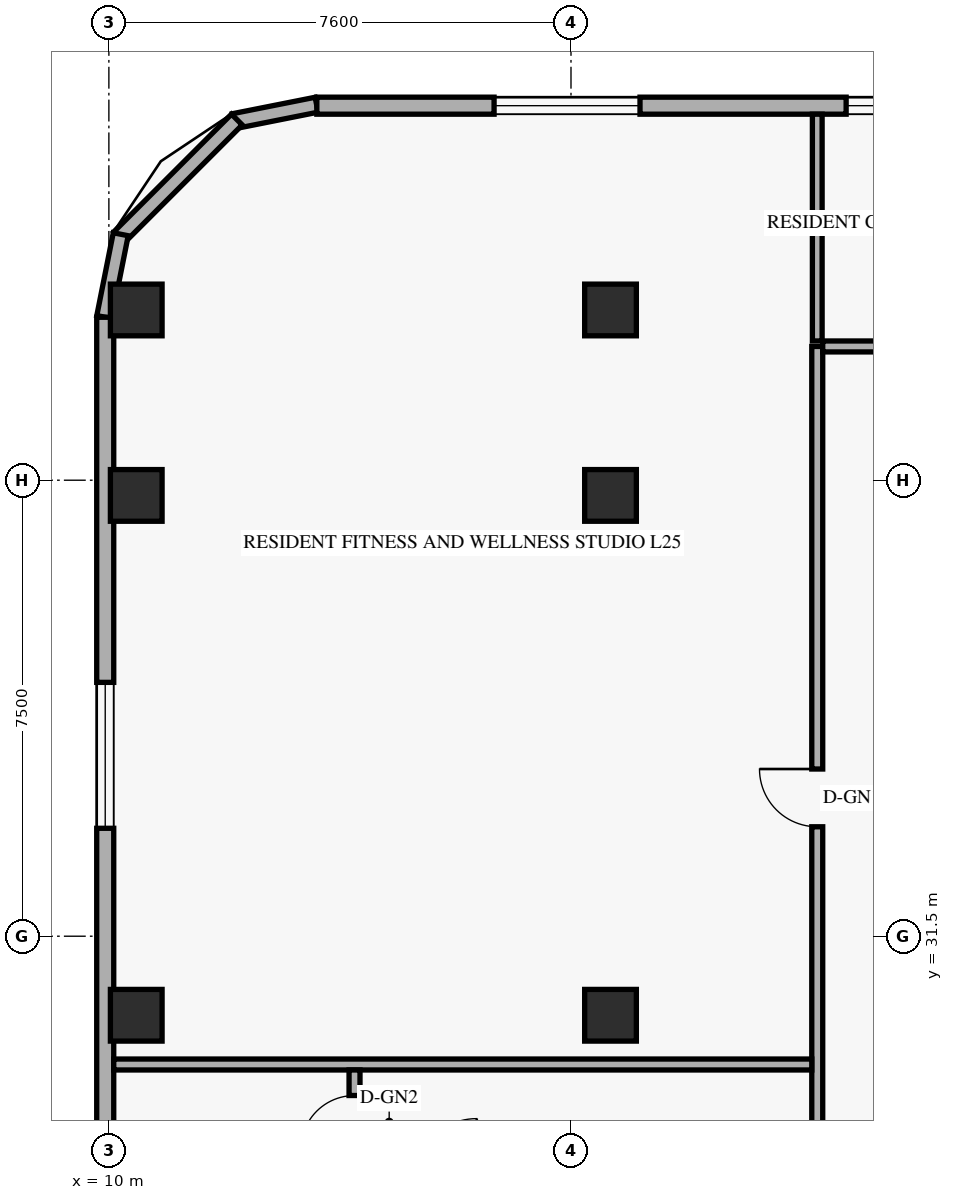
"""IFC4 building model, lengths in metres.
Left out: names, types, materials, properties, quantities, classifications, styles, units other than length and angle.
Written with IfcOpenShell. Run it as: python <this file> out.ifc"""

import sys

from ifc_helpers import new_model, si_unit, direction, frame, frame_2d, origin, origin_2d, place, context, subcontext, project, spatial, rectangle, extrude, element, fill, save


model = new_model("IFC4")
c1 = context("Model", 3, precision=1e-05, world=origin(), true_north=direction((0.0, 1.0)))
c2 = subcontext(c1, "Body", "Model", "MODEL_VIEW")
j1 = project(units=[si_unit("LENGTHUNIT", "METRE"), si_unit("PLANEANGLEUNIT", "RADIAN")], contexts=[c1])
p1 = place(None, origin())
s1 = spatial("IfcSite", under=j1, at=p1, CompositionType="ELEMENT")
p2 = place(p1, origin())
s2 = spatial("IfcBuilding", under=s1, at=p2, CompositionType="ELEMENT")
p3 = place(p2, frame((0.0, 0.0, 98.4)))
s3 = spatial("IfcBuildingStorey", under=s2, at=p3, CompositionType="ELEMENT", Elevation=98.4)
for number, where, z_axis, x_axis in (
    (1, (10.45, 30.2, 0.0), (0.0, 0.0, 1.0), (1.0, 0.0, 0.0)),
    (2, (10.45, 38.75, 0.0), (0.0, 0.0, 1.0), (1.0, 0.0, 0.0)),
    (3, (10.45, 41.8, 0.0), (0.0, 0.0, 1.0), (1.0, 0.0, 0.0)),
    (4, (18.25, 30.2, 0.0), (0.0, 0.0, 1.0), (1.0, 0.0, 0.0)),
    (5, (18.25, 38.75, 0.0), (0.0, 0.0, 1.0), (1.0, 0.0, 0.0)),
    (6, (18.25, 41.8, 0.0), (0.0, 0.0, 1.0), (1.0, 0.0, 0.0)),
):
    element("IfcColumn", number, at=place(p3, frame(where, z_axis=z_axis, x_axis=x_axis)), inside=s3, PredefinedType="COLUMN", context=c2, shape_type="SweptSolid", body=[
        extrude(rectangle(XDim=0.85, YDim=0.85, at=origin_2d()), origin(), (0.0, 0.0, 1.0), 4.2),
    ])
p4 = place(p3, frame((13.417, 45.176, 0.0), z_axis=(0.0, 0.0, 1.0), x_axis=(-0.980809899341, -0.19496651342, 0.0)))
e7 = element("IfcWall", 7, at=p4, inside=s3, PredefinedType="SOLIDWALL", context=c2, shape_type="SweptSolid", body=[
    extrude(rectangle(XDim=1.389, YDim=0.25, at=frame_2d((0.694, 0.0))), origin(), (0.0, 0.0, 1.0), 3.96),
])
p5 = place(p3, frame((12.105, 44.932, 0.0), z_axis=(0.0, 0.0, 1.0), x_axis=(-0.707151344399, -0.707062215165, 0.0)))
e8 = element("IfcWall", 8, at=p5, inside=s3, PredefinedType="SOLIDWALL", context=c2, shape_type="SweptSolid", body=[
    extrude(rectangle(XDim=2.739, YDim=0.25, at=frame_2d((1.37, 0.0))), origin(), (0.0, 0.0, 1.0), 3.96),
])
p6 = place(p3, frame((10.195, 43.045, 0.0), z_axis=(0.0, 0.0, 1.0), x_axis=(-0.195000137217, -0.980803214965, 0.0)))
e9 = element("IfcWall", 9, at=p6, inside=s3, PredefinedType="SOLIDWALL", context=c2, shape_type="SweptSolid", body=[
    extrude(rectangle(XDim=1.388, YDim=0.25, at=frame_2d((0.694, 0.0))), origin(), (0.0, 0.0, 1.0), 3.96),
])
p7 = place(p3, frame((25.0, 45.16, 0.0), z_axis=(0.0, 0.0, 1.0), x_axis=(-1.0, 0.0, 0.0)))
e10 = element("IfcWall", 10, at=p7, inside=s3, PredefinedType="SOLIDWALL", context=c2, shape_type="SweptSolid", body=[
    extrude(rectangle(XDim=11.58, YDim=0.28, at=frame_2d((5.79, 0.0))), origin(), (0.0, 0.0, 1.0), 3.96),
])
p8 = place(p7, frame((6.265, 0.0, 0.85)))
e11 = element("IfcOpeningElement", 11, at=p8, cuts=e10, PredefinedType="OPENING", context=c2, shape_type="SweptSolid", body=[
    extrude(rectangle(XDim=2.4, YDim=1.9, at=frame_2d((1.2, 0.95))), frame((0.0, 0.15, 0.0), z_axis=(0.0, -1.0, 0.0), x_axis=(1.0, 0.0, 0.0)), (0.0, 0.0, 1.0), 0.3),
])
p9 = place(p7, frame((0.475, 0.0, 0.85)))
e12 = element("IfcOpeningElement", 12, at=p9, cuts=e10, PredefinedType="OPENING", context=c2, shape_type="SweptSolid", body=[
    extrude(rectangle(XDim=2.4, YDim=1.9, at=frame_2d((1.2, 0.95))), frame((0.0, 0.15, 0.0), z_axis=(0.0, -1.0, 0.0), x_axis=(1.0, 0.0, 0.0)), (0.0, 0.0, 1.0), 0.3),
])
p10 = place(p3, frame((9.94, 41.68, 0.0), z_axis=(0.0, 0.0, 1.0), x_axis=(0.0, -1.0, 0.0)))
e13 = element("IfcWall", 13, at=p10, inside=s3, PredefinedType="SOLIDWALL", context=c2, shape_type="SweptSolid", body=[
    extrude(rectangle(XDim=35.36, YDim=0.28, at=frame_2d((17.68, 0.0))), origin(), (0.0, 0.0, 1.0), 3.96),
])
p11 = place(p10, frame((27.08, 0.0, 0.85)))
e14 = element("IfcOpeningElement", 14, at=p11, cuts=e13, PredefinedType="OPENING", context=c2, shape_type="SweptSolid", body=[
    extrude(rectangle(XDim=2.4, YDim=1.9, at=frame_2d((1.2, 0.95))), frame((0.0, 0.15, 0.0), z_axis=(0.0, -1.0, 0.0), x_axis=(1.0, 0.0, 0.0)), (0.0, 0.0, 1.0), 0.3),
])
p12 = place(p10, frame((15.94, 0.0, 0.85)))
e15 = element("IfcOpeningElement", 15, at=p12, cuts=e13, PredefinedType="OPENING", context=c2, shape_type="SweptSolid", body=[
    extrude(rectangle(XDim=2.4, YDim=1.9, at=frame_2d((1.2, 0.95))), frame((0.0, 0.15, 0.0), z_axis=(0.0, -1.0, 0.0), x_axis=(1.0, 0.0, 0.0)), (0.0, 0.0, 1.0), 0.3),
])
p13 = place(p10, frame((6.005, 0.0, 0.85)))
e16 = element("IfcOpeningElement", 16, at=p13, cuts=e13, PredefinedType="OPENING", context=c2, shape_type="SweptSolid", body=[
    extrude(rectangle(XDim=2.4, YDim=1.9, at=frame_2d((1.2, 0.95))), frame((0.0, 0.15, 0.0), z_axis=(0.0, -1.0, 0.0), x_axis=(1.0, 0.0, 0.0)), (0.0, 0.0, 1.0), 0.3),
])
p14 = place(p3, frame((21.65, 6.8, 0.0), z_axis=(0.0, 0.0, 1.0), x_axis=(0.0, 1.0, 0.0)))
e17 = element("IfcWall", 17, at=p14, inside=s3, PredefinedType="STANDARD", context=c2, shape_type="SweptSolid", body=[
    extrude(rectangle(XDim=34.4, YDim=0.18, at=frame_2d((17.2, 0.0))), origin(), (0.0, 0.0, 1.0), 3.331),
])
p15 = place(p14, frame((15.2, 0.0, 0.0)))
e18 = element("IfcOpeningElement", 18, at=p15, cuts=e17, PredefinedType="OPENING", context=c2, shape_type="SweptSolid", body=[
    extrude(rectangle(XDim=0.95, YDim=2.15, at=frame_2d((0.475, 1.075))), frame((0.0, 0.1, 0.0), z_axis=(0.0, -1.0, 0.0), x_axis=(1.0, 0.0, 0.0)), (0.0, 0.0, 1.0), 0.2),
])
p16 = place(p14, frame((6.2, 0.0, 0.0)))
e19 = element("IfcOpeningElement", 19, at=p16, cuts=e17, PredefinedType="OPENING", context=c2, shape_type="SweptSolid", body=[
    extrude(rectangle(XDim=0.95, YDim=2.15, at=frame_2d((0.475, 1.075))), frame((0.0, 0.1, 0.0), z_axis=(0.0, -1.0, 0.0), x_axis=(1.0, 0.0, 0.0)), (0.0, 0.0, 1.0), 0.2),
])
p17 = place(p14, frame((26.5, 0.0, 0.0)))
e20 = element("IfcOpeningElement", 20, at=p17, cuts=e17, PredefinedType="OPENING", context=c2, shape_type="SweptSolid", body=[
    extrude(rectangle(XDim=0.95, YDim=2.15, at=frame_2d((0.475, 1.075))), frame((0.0, 0.1, 0.0), z_axis=(0.0, -1.0, 0.0), x_axis=(1.0, 0.0, 0.0)), (0.0, 0.0, 1.0), 0.2),
])
p18 = place(p3, frame((21.74, 41.2, 0.0), z_axis=(0.0, 0.0, 1.0), x_axis=(1.0, 0.0, 0.0)))
e21 = element("IfcWall", 21, at=p18, inside=s3, PredefinedType="STANDARD", context=c2, shape_type="SweptSolid", body=[
    extrude(rectangle(XDim=15.57, YDim=0.18, at=frame_2d((7.785, 0.0))), origin(), (0.0, 0.0, 1.0), 3.331),
])
p19 = place(p18, frame((5.41, 0.0, 0.0)))
e22 = element("IfcOpeningElement", 22, at=p19, cuts=e21, PredefinedType="OPENING", context=c2, shape_type="SweptSolid", body=[
    extrude(rectangle(XDim=0.95, YDim=2.15, at=frame_2d((0.475, 1.075))), frame((0.0, 0.1, 0.0), z_axis=(0.0, -1.0, 0.0), x_axis=(1.0, 0.0, 0.0)), (0.0, 0.0, 1.0), 0.2),
])
p20 = place(p3, frame((21.65, 41.29, 0.0), z_axis=(0.0, 0.0, 1.0), x_axis=(0.0, 1.0, 0.0)))
e23 = element("IfcWall", 23, at=p20, inside=s3, PredefinedType="PARTITIONING", context=c2, shape_type="SweptSolid", body=[
    extrude(rectangle(XDim=3.73, YDim=0.16, at=frame_2d((1.865, 0.0))), origin(), (0.0, 0.0, 1.0), 3.409),
])
p21 = place(p3, frame((10.08, 29.39, 0.0), z_axis=(0.0, 0.0, 1.0), x_axis=(1.0, 0.0, 0.0)))
e24 = element("IfcWall", 24, at=p21, inside=s3, PredefinedType="STANDARD", context=c2, shape_type="SweptSolid", body=[
    extrude(rectangle(XDim=11.48, YDim=0.18, at=frame_2d((5.74, 0.0))), origin(), (0.0, 0.0, 1.0), 3.331),
])
p22 = place(p3, frame((14.04, 27.45, 0.0), z_axis=(0.0, 0.0, 1.0), x_axis=(0.0, 1.0, 0.0)))
e25 = element("IfcWall", 25, at=p22, inside=s3, PredefinedType="STANDARD", context=c2, shape_type="SweptSolid", body=[
    extrude(rectangle(XDim=1.85, YDim=0.18, at=frame_2d((0.925, 0.0))), origin(), (0.0, 0.0, 1.0), 3.96),
])
p23 = place(p22, frame((0.55, 0.0, 0.0)))
e26 = element("IfcOpeningElement", 26, at=p23, cuts=e25, PredefinedType="OPENING", context=c2, shape_type="SweptSolid", body=[
    extrude(rectangle(XDim=0.88, YDim=2.12, at=frame_2d((0.44, 1.06))), frame((0.0, 0.1, 0.0), z_axis=(0.0, -1.0, 0.0), x_axis=(1.0, 0.0, 0.0)), (0.0, 0.0, 1.0), 0.2),
])
p24 = place(p8, origin())
e27 = element("IfcWindow", 27, at=p24, inside=s3, PartitioningType="SINGLE_PANEL", PredefinedType="WINDOW", context=c2, shape_type="SweptSolid", body=[
    extrude(rectangle(XDim=2.4, YDim=1.9, at=frame_2d((1.2, 0.95))), frame((0.0, 0.03, 0.0), z_axis=(0.0, -1.0, 0.0), x_axis=(1.0, 0.0, 0.0)), (0.0, 0.0, 1.0), 0.06),
])
fill(e11, e27)
p25 = place(p9, origin())
e28 = element("IfcWindow", 28, at=p25, inside=s3, PartitioningType="SINGLE_PANEL", PredefinedType="WINDOW", context=c2, shape_type="SweptSolid", body=[
    extrude(rectangle(XDim=2.4, YDim=1.9, at=frame_2d((1.2, 0.95))), frame((0.0, 0.03, 0.0), z_axis=(0.0, -1.0, 0.0), x_axis=(1.0, 0.0, 0.0)), (0.0, 0.0, 1.0), 0.06),
])
fill(e12, e28)
p26 = place(p13, origin())
e29 = element("IfcWindow", 29, at=p26, inside=s3, PartitioningType="SINGLE_PANEL", PredefinedType="WINDOW", context=c2, shape_type="SweptSolid", body=[
    extrude(rectangle(XDim=2.4, YDim=1.9, at=frame_2d((1.2, 0.95))), frame((0.0, 0.03, 0.0), z_axis=(0.0, -1.0, 0.0), x_axis=(1.0, 0.0, 0.0)), (0.0, 0.0, 1.0), 0.06),
])
fill(e16, e29)
p27 = place(p23, origin())
e30 = element("IfcDoor", 30, at=p27, inside=s3, OperationType="SINGLE_SWING_LEFT", PredefinedType="DOOR", context=c2, shape_type="SweptSolid", body=[
    extrude(rectangle(XDim=0.88, YDim=2.12, at=frame_2d((0.44, 1.06))), frame((0.0, 0.025, 0.0), z_axis=(0.0, -1.0, 0.0), x_axis=(1.0, 0.0, 0.0)), (0.0, 0.0, 1.0), 0.05),
])
fill(e26, e30)
p28 = place(p17, origin())
e31 = element("IfcDoor", 31, at=p28, inside=s3, OperationType="SINGLE_SWING_RIGHT", PredefinedType="DOOR", context=c2, shape_type="SweptSolid", body=[
    extrude(rectangle(XDim=0.95, YDim=2.15, at=frame_2d((0.475, 1.075))), frame((0.0, 0.025, 0.0), z_axis=(0.0, -1.0, 0.0), x_axis=(1.0, 0.0, 0.0)), (0.0, 0.0, 1.0), 0.05),
])
fill(e20, e31)
save(model, sys.argv[1])
